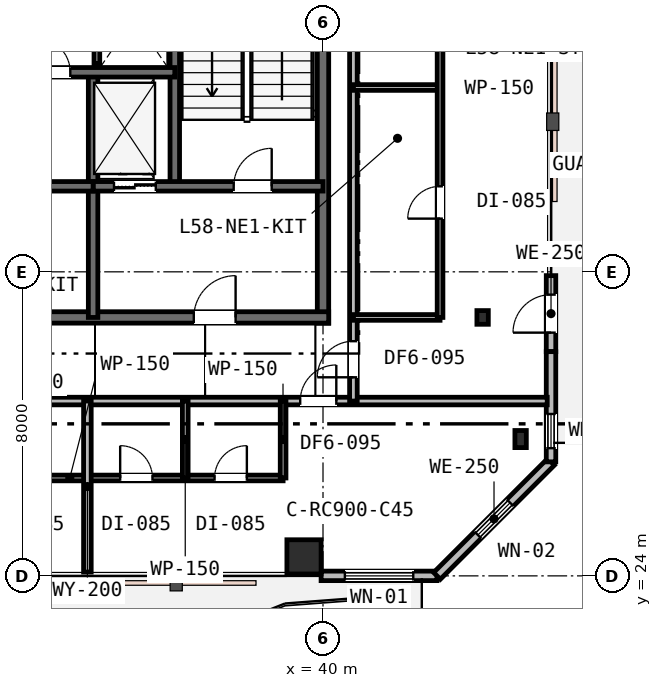
"""IFC4 building model, lengths in metres.
Left out: names, types, materials, properties, quantities, classifications, styles, units other than length and angle.
Written with IfcOpenShell. Run it as: python <this file> out.ifc"""

import sys

from ifc_helpers import new_model, si_unit, direction, frame, frame_2d, origin, origin_2d, place, context, subcontext, project, spatial, rectangle, i_section, extrude, element, fill, save


model = new_model("IFC4")
c1 = context("Model", 3, precision=1e-05, world=origin(), true_north=direction((0.0, 1.0)))
c2 = subcontext(c1, "Body", "Model", "MODEL_VIEW")
j1 = project(units=[si_unit("LENGTHUNIT", "METRE"), si_unit("PLANEANGLEUNIT", "RADIAN")], contexts=[c1])
p1 = place(None, origin())
s1 = spatial("IfcSite", under=j1, at=p1, CompositionType="ELEMENT")
p2 = place(p1, origin())
s2 = spatial("IfcBuilding", under=s1, at=p2, CompositionType="ELEMENT")
p3 = place(p2, frame((0.0, 0.0, 226.0)))
s3 = spatial("IfcBuildingStorey", under=s2, at=p3, CompositionType="ELEMENT", Elevation=226.0)
p4 = place(p3, frame((40.0, 30.65, 0.0), z_axis=(0.0, 0.0, 1.0), x_axis=(0.0, 1.0, 0.0)))
e1 = element("IfcWall", 1, at=p4, inside=s3, PredefinedType="SHEAR", context=c2, shape_type="SweptSolid", body=[
    extrude(rectangle(XDim=12.3, YDim=0.3, at=frame_2d((6.15, 0.0))), origin(), (0.0, 0.0, 1.0), 3.8),
])
p5 = place(p3, frame((28.95, 30.8, 0.0), z_axis=(0.0, 0.0, 1.0), x_axis=(1.0, 0.0, 0.0)))
e2 = element("IfcWall", 2, at=p5, inside=s3, PredefinedType="SHEAR", context=c2, shape_type="SweptSolid", body=[
    extrude(rectangle(XDim=11.2, YDim=0.3, at=frame_2d((5.6, 0.0))), origin(), (0.0, 0.0, 1.0), 3.8),
])
p6 = place(p5, frame((7.65, 0.0, 0.0)))
e3 = element("IfcOpeningElement", 3, at=p6, cuts=e2, PredefinedType="OPENING", context=c2, shape_type="SweptSolid", body=[
    extrude(rectangle(XDim=1.1, YDim=2.15, at=frame_2d((0.55, 1.075))), frame((0.0, 0.16, 0.0), z_axis=(0.0, -1.0, 0.0), x_axis=(1.0, 0.0, 0.0)), (0.0, 0.0, 1.0), 0.32),
])
p7 = place(p3, frame((36.1, 34.25, 0.0), z_axis=(0.0, 0.0, 1.0), x_axis=(0.0, 1.0, 0.0)))
e4 = element("IfcWall", 4, at=p7, inside=s3, PredefinedType="SHEAR", context=c2, shape_type="SweptSolid", body=[
    extrude(rectangle(XDim=8.65, YDim=0.25, at=frame_2d((4.325, 0.0))), origin(), (0.0, 0.0, 1.0), 3.8),
])
p8 = place(p3, frame((33.95, 30.8, 0.0), z_axis=(0.0, 0.0, 1.0), x_axis=(0.0, 1.0, 0.0)))
e5 = element("IfcWall", 5, at=p8, inside=s3, PredefinedType="SHEAR", context=c2, shape_type="SweptSolid", body=[
    extrude(rectangle(XDim=6.45, YDim=0.25, at=frame_2d((3.225, 0.0))), origin(), (0.0, 0.0, 1.0), 3.8),
])
p9 = place(p3, frame((33.95, 34.25, 0.0), z_axis=(0.0, 0.0, 1.0), x_axis=(1.0, 0.0, 0.0)))
e6 = element("IfcWall", 6, at=p9, inside=s3, PredefinedType="SHEAR", context=c2, shape_type="SweptSolid", body=[
    extrude(rectangle(XDim=6.05, YDim=0.25, at=frame_2d((3.025, 0.0))), origin(), (0.0, 0.0, 1.0), 3.8),
])
p10 = place(p9, frame((3.7, 0.0, 0.0)))
e7 = element("IfcOpeningElement", 7, at=p10, cuts=e6, PredefinedType="OPENING", context=c2, shape_type="SweptSolid", body=[
    extrude(rectangle(XDim=1.0, YDim=2.15, at=frame_2d((0.5, 1.075))), frame((0.0, 0.135, 0.0), z_axis=(0.0, -1.0, 0.0), x_axis=(1.0, 0.0, 0.0)), (0.0, 0.0, 1.0), 0.27),
])
p11 = place(p9, frame((0.55, 0.0, 0.0)))
e8 = element("IfcOpeningElement", 8, at=p11, cuts=e6, PredefinedType="OPENING", context=c2, shape_type="SweptSolid", body=[
    extrude(rectangle(XDim=1.1, YDim=2.15, at=frame_2d((0.55, 1.075))), frame((0.0, 0.135, 0.0), z_axis=(0.0, -1.0, 0.0), x_axis=(1.0, 0.0, 0.0)), (0.0, 0.0, 1.0), 0.27),
])
p12 = place(p3, frame((28.95, 34.25, 0.0), z_axis=(0.0, 0.0, 1.0), x_axis=(1.0, 0.0, 0.0)))
e9 = element("IfcWall", 9, at=p12, inside=s3, PredefinedType="SHEAR", context=c2, shape_type="SweptSolid", body=[
    extrude(rectangle(XDim=5.0, YDim=0.25, at=frame_2d((2.5, 0.0))), origin(), (0.0, 0.0, 1.0), 3.8),
])
p13 = place(p12, frame((1.95, 0.0, 0.0)))
e10 = element("IfcOpeningElement", 10, at=p13, cuts=e9, PredefinedType="OPENING", context=c2, shape_type="SweptSolid", body=[
    extrude(rectangle(XDim=1.0, YDim=2.15, at=frame_2d((0.5, 1.075))), frame((0.0, 0.135, 0.0), z_axis=(0.0, -1.0, 0.0), x_axis=(1.0, 0.0, 0.0)), (0.0, 0.0, 1.0), 0.27),
])
p14 = place(p3, frame((19.9, 37.25, 0.0), z_axis=(0.0, 0.0, 1.0), x_axis=(1.0, 0.0, 0.0)))
e11 = element("IfcWall", 11, at=p14, inside=s3, PredefinedType="SHEAR", context=c2, shape_type="SweptSolid", body=[
    extrude(rectangle(XDim=16.2, YDim=0.25, at=frame_2d((8.1, 0.0))), origin(), (0.0, 0.0, 1.0), 3.8),
])
p15 = place(p14, frame((12.55, 0.0, 0.0)))
e12 = element("IfcOpeningElement", 12, at=p15, cuts=e11, PredefinedType="OPENING", context=c2, shape_type="SweptSolid", body=[
    extrude(rectangle(XDim=0.9, YDim=2.15, at=frame_2d((0.45, 1.075))), frame((0.0, 0.135, 0.0), z_axis=(0.0, -1.0, 0.0), x_axis=(1.0, 0.0, 0.0)), (0.0, 0.0, 1.0), 0.27),
])
p16 = place(p14, frame((2.5, 0.0, 0.0)))
e13 = element("IfcOpeningElement", 13, at=p16, cuts=e11, PredefinedType="OPENING", context=c2, shape_type="SweptSolid", body=[
    extrude(rectangle(XDim=1.05, YDim=2.15, at=frame_2d((0.525, 1.075))), frame((0.0, 0.135, 0.0), z_axis=(0.0, -1.0, 0.0), x_axis=(1.0, 0.0, 0.0)), (0.0, 0.0, 1.0), 0.27),
])
p17 = place(p14, frame((4.4, 0.0, 0.0)))
e14 = element("IfcOpeningElement", 14, at=p17, cuts=e11, PredefinedType="OPENING", context=c2, shape_type="SweptSolid", body=[
    extrude(rectangle(XDim=1.05, YDim=2.15, at=frame_2d((0.525, 1.075))), frame((0.0, 0.135, 0.0), z_axis=(0.0, -1.0, 0.0), x_axis=(1.0, 0.0, 0.0)), (0.0, 0.0, 1.0), 0.27),
])
p18 = place(p14, frame((6.3, 0.0, 0.0)))
e15 = element("IfcOpeningElement", 15, at=p18, cuts=e11, PredefinedType="OPENING", context=c2, shape_type="SweptSolid", body=[
    extrude(rectangle(XDim=1.05, YDim=2.15, at=frame_2d((0.525, 1.075))), frame((0.0, 0.135, 0.0), z_axis=(0.0, -1.0, 0.0), x_axis=(1.0, 0.0, 0.0)), (0.0, 0.0, 1.0), 0.27),
])
p19 = place(p3, frame((39.5, 24.5, 0.0), z_axis=(0.0, 0.0, 1.0), x_axis=(1.0, 0.0, 0.0)))
e16 = element("IfcColumn", 16, at=p19, inside=s3, PredefinedType="COLUMN", context=c2, shape_type="SweptSolid", body=[
    extrude(rectangle(XDim=0.9, YDim=0.9, at=origin_2d()), origin(), (0.0, 0.0, 1.0), 3.8),
])
p20 = place(p3, frame((45.2, 27.6, 0.0), z_axis=(0.0, 0.0, 1.0), x_axis=(1.0, 0.0, 0.0)))
e17 = element("IfcColumn", 17, at=p20, inside=s3, PredefinedType="COLUMN", context=c2, shape_type="SweptSolid", body=[
    extrude(i_section(OverallWidth=0.3, OverallDepth=0.45, WebThickness=0.014, FlangeThickness=0.026, FilletRadius=0.027, at=origin_2d()), origin(), (0.0, 0.0, 1.0), 3.8),
])
p21 = place(p3, frame((44.2, 30.8, 0.0), z_axis=(0.0, 0.0, 1.0), x_axis=(1.0, 0.0, 0.0)))
e18 = element("IfcColumn", 18, at=p21, inside=s3, PredefinedType="COLUMN", context=c2, shape_type="SweptSolid", body=[
    extrude(i_section(OverallWidth=0.3, OverallDepth=0.36, WebThickness=0.013, FlangeThickness=0.022, FilletRadius=0.027, at=origin_2d()), origin(), (0.0, 0.0, 1.0), 3.8),
])
p22 = place(p3, frame((39.95, 24.0, 0.0), z_axis=(0.0, 0.0, 1.0), x_axis=(1.0, 0.0, 0.0)))
e19 = element("IfcWall", 19, at=p22, inside=s3, PredefinedType="STANDARD", context=c2, shape_type="SweptSolid", body=[
    extrude(rectangle(XDim=3.05, YDim=0.25, at=frame_2d((1.525, 0.0))), origin(), (0.0, 0.0, 1.0), 3.53),
])
p23 = place(p22, frame((0.625, 0.0, 0.75)))
e20 = element("IfcOpeningElement", 20, at=p23, cuts=e19, PredefinedType="OPENING", context=c2, shape_type="SweptSolid", body=[
    extrude(rectangle(XDim=1.8, YDim=1.85, at=frame_2d((0.9, 0.925))), frame((0.0, 0.135, 0.0), z_axis=(0.0, -1.0, 0.0), x_axis=(1.0, 0.0, 0.0)), (0.0, 0.0, 1.0), 0.27),
])
p24 = place(p3, frame((43.0, 24.0, 0.0), z_axis=(0.0, 0.0, 1.0), x_axis=(0.707106781187, 0.707106781187, 0.0)))
e21 = element("IfcWall", 21, at=p24, inside=s3, PredefinedType="STANDARD", context=c2, shape_type="SweptSolid", body=[
    extrude(rectangle(XDim=4.243, YDim=0.25, at=frame_2d((2.121, 0.0))), origin(), (0.0, 0.0, 1.0), 3.53),
])
p25 = place(p24, frame((1.521, 0.0, 0.85)))
e22 = element("IfcOpeningElement", 22, at=p25, cuts=e21, PredefinedType="OPENING", context=c2, shape_type="SweptSolid", body=[
    extrude(rectangle(XDim=1.2, YDim=1.6, at=frame_2d((0.6, 0.8))), frame((0.0, 0.135, 0.0), z_axis=(0.0, -1.0, 0.0), x_axis=(1.0, 0.0, 0.0)), (0.0, 0.0, 1.0), 0.27),
])
p26 = place(p3, frame((46.0, 29.9, 0.0), z_axis=(0.0, 0.0, 1.0), x_axis=(0.0, 1.0, 0.0)))
e23 = element("IfcWall", 23, at=p26, inside=s3, PredefinedType="STANDARD", context=c2, shape_type="SweptSolid", body=[
    extrude(rectangle(XDim=2.0, YDim=0.25, at=frame_2d((1.0, 0.0))), origin(), (0.0, 0.0, 1.0), 3.53),
])
p27 = place(p26, frame((0.5, 0.0, 0.0)))
e24 = element("IfcOpeningElement", 24, at=p27, cuts=e23, PredefinedType="OPENING", context=c2, shape_type="SweptSolid", body=[
    extrude(rectangle(XDim=1.0, YDim=2.15, at=frame_2d((0.5, 1.075))), frame((0.0, 0.135, 0.0), z_axis=(0.0, -1.0, 0.0), x_axis=(1.0, 0.0, 0.0)), (0.0, 0.0, 1.0), 0.27),
])
p28 = place(p3, frame((46.0, 27.0, 0.0), z_axis=(0.0, 0.0, 1.0), x_axis=(0.0, 1.0, 0.0)))
e25 = element("IfcWall", 25, at=p28, inside=s3, PredefinedType="STANDARD", context=c2, shape_type="SweptSolid", body=[
    extrude(rectangle(XDim=2.9, YDim=0.25, at=frame_2d((1.45, 0.0))), origin(), (0.0, 0.0, 1.0), 3.53),
])
p29 = place(p28, frame((0.36, 0.0, 0.9)))
e26 = element("IfcOpeningElement", 26, at=p29, cuts=e25, PredefinedType="OPENING", context=c2, shape_type="SweptSolid", body=[
    extrude(rectangle(XDim=0.9, YDim=1.55, at=frame_2d((0.45, 0.775))), frame((0.0, 0.135, 0.0), z_axis=(0.0, -1.0, 0.0), x_axis=(1.0, 0.0, 0.0)), (0.0, 0.0, 1.0), 0.27),
])
p30 = place(p3, frame((34.05, 37.473, 0.0), z_axis=(0.0, 0.0, 1.0), x_axis=(0.0, 1.0, 0.0)))
e27 = element("IfcWall", 27, at=p30, inside=s3, PredefinedType="PLUMBINGWALL", context=c2, shape_type="SweptSolid", body=[
    extrude(rectangle(XDim=2.577, YDim=0.15, at=frame_2d((1.288, 0.0))), origin(), (0.0, 0.0, 1.0), 3.53),
])
p31 = place(p3, frame((13.6, 28.6, 0.0), z_axis=(0.0, 0.0, 1.0), x_axis=(1.0, 0.0, 0.0)))
e28 = element("IfcWall", 28, at=p31, inside=s3, PredefinedType="PARTITIONING", context=c2, shape_type="SweptSolid", body=[
    extrude(rectangle(XDim=32.3, YDim=0.2, at=frame_2d((16.15, 0.0))), origin(), (0.0, 0.0, 1.0), 2.92),
])
p32 = place(p31, frame((11.787, 0.0, 0.0)))
e29 = element("IfcOpeningElement", 29, at=p32, cuts=e28, PredefinedType="OPENING", context=c2, shape_type="SweptSolid", body=[
    extrude(rectangle(XDim=0.95, YDim=2.15, at=frame_2d((0.475, 1.075))), frame((0.0, 0.11, 0.0), z_axis=(0.0, -1.0, 0.0), x_axis=(1.0, 0.0, 0.0)), (0.0, 0.0, 1.0), 0.22),
])
p33 = place(p31, frame((25.8, 0.0, 0.0)))
e30 = element("IfcOpeningElement", 30, at=p33, cuts=e28, PredefinedType="OPENING", context=c2, shape_type="SweptSolid", body=[
    extrude(rectangle(XDim=0.95, YDim=2.15, at=frame_2d((0.475, 1.075))), frame((0.0, 0.11, 0.0), z_axis=(0.0, -1.0, 0.0), x_axis=(1.0, 0.0, 0.0)), (0.0, 0.0, 1.0), 0.22),
])
p34 = place(p3, frame((40.8, 28.6, 0.0), z_axis=(0.0, 0.0, 1.0), x_axis=(0.0, 1.0, 0.0)))
e31 = element("IfcWall", 31, at=p34, inside=s3, PredefinedType="PARTITIONING", context=c2, shape_type="SweptSolid", body=[
    extrude(rectangle(XDim=14.3, YDim=0.2, at=frame_2d((7.15, 0.0))), origin(), (0.0, 0.0, 1.0), 2.92),
])
p35 = place(p34, frame((0.625, 0.0, 0.0)))
e32 = element("IfcOpeningElement", 32, at=p35, cuts=e31, PredefinedType="OPENING", context=c2, shape_type="SweptSolid", body=[
    extrude(rectangle(XDim=0.95, YDim=2.15, at=frame_2d((0.475, 1.075))), frame((0.0, 0.11, 0.0), z_axis=(0.0, -1.0, 0.0), x_axis=(1.0, 0.0, 0.0)), (0.0, 0.0, 1.0), 0.22),
])
p36 = place(p3, frame((40.8, 30.8, 0.0), z_axis=(0.0, 0.0, 1.0), x_axis=(1.0, 0.0, 0.0)))
e33 = element("IfcWall", 33, at=p36, inside=s3, PredefinedType="PARTITIONING", context=c2, shape_type="SweptSolid", body=[
    extrude(rectangle(XDim=2.28, YDim=0.15, at=frame_2d((1.14, 0.0))), origin(), (0.0, 0.0, 1.0), 2.92),
])
p37 = place(p3, frame((40.8, 36.85, 0.0), z_axis=(0.0, 0.0, 1.0), x_axis=(1.0, 0.0, 0.0)))
e34 = element("IfcWall", 34, at=p37, inside=s3, PredefinedType="PARTITIONING", context=c2, shape_type="SweptSolid", body=[
    extrude(rectangle(XDim=2.28, YDim=0.15, at=frame_2d((1.14, 0.0))), origin(), (0.0, 0.0, 1.0), 3.53),
])
p38 = place(p3, frame((43.08, 30.8, 0.0), z_axis=(0.0, 0.0, 1.0), x_axis=(0.0, 1.0, 0.0)))
e35 = element("IfcWall", 35, at=p38, inside=s3, PredefinedType="PARTITIONING", context=c2, shape_type="SweptSolid", body=[
    extrude(rectangle(XDim=12.02, YDim=0.15, at=frame_2d((6.01, 0.0))), origin(), (0.0, 0.0, 1.0), 2.92),
])
p39 = place(p38, frame((2.6, 0.0, 0.0)))
e36 = element("IfcOpeningElement", 36, at=p39, cuts=e35, PredefinedType="OPENING", context=c2, shape_type="SweptSolid", body=[
    extrude(rectangle(XDim=0.85, YDim=2.15, at=frame_2d((0.425, 1.075))), frame((0.0, 0.085, 0.0), z_axis=(0.0, -1.0, 0.0), x_axis=(1.0, 0.0, 0.0)), (0.0, 0.0, 1.0), 0.17),
])
p40 = place(p38, frame((10.629, 0.0, 0.0)))
e37 = element("IfcOpeningElement", 37, at=p40, cuts=e35, PredefinedType="OPENING", context=c2, shape_type="SweptSolid", body=[
    extrude(rectangle(XDim=0.85, YDim=2.15, at=frame_2d((0.425, 1.075))), frame((0.0, 0.085, 0.0), z_axis=(0.0, -1.0, 0.0), x_axis=(1.0, 0.0, 0.0)), (0.0, 0.0, 1.0), 0.17),
])
p41 = place(p3, frame((27.724, 26.576, 0.0), z_axis=(0.0, 0.0, 1.0), x_axis=(1.0, 0.0, 0.0)))
e38 = element("IfcWall", 38, at=p41, inside=s3, PredefinedType="PARTITIONING", context=c2, shape_type="SweptSolid", body=[
    extrude(rectangle(XDim=11.226, YDim=0.15, at=frame_2d((5.613, 0.0))), origin(), (0.0, 0.0, 1.0), 2.92),
])
p42 = place(p41, frame((1.094, 0.0, 0.0)))
e39 = element("IfcOpeningElement", 39, at=p42, cuts=e38, PredefinedType="OPENING", context=c2, shape_type="SweptSolid", body=[
    extrude(rectangle(XDim=0.85, YDim=2.15, at=frame_2d((0.425, 1.075))), frame((0.0, 0.085, 0.0), z_axis=(0.0, -1.0, 0.0), x_axis=(1.0, 0.0, 0.0)), (0.0, 0.0, 1.0), 0.17),
])
p43 = place(p41, frame((4.132, 0.0, 0.0)))
e40 = element("IfcOpeningElement", 40, at=p43, cuts=e38, PredefinedType="OPENING", context=c2, shape_type="SweptSolid", body=[
    extrude(rectangle(XDim=0.85, YDim=2.15, at=frame_2d((0.425, 1.075))), frame((0.0, 0.085, 0.0), z_axis=(0.0, -1.0, 0.0), x_axis=(1.0, 0.0, 0.0)), (0.0, 0.0, 1.0), 0.17),
])
p44 = place(p41, frame((6.939, 0.0, 0.0)))
e41 = element("IfcOpeningElement", 41, at=p44, cuts=e38, PredefinedType="OPENING", context=c2, shape_type="SweptSolid", body=[
    extrude(rectangle(XDim=0.85, YDim=2.15, at=frame_2d((0.425, 1.075))), frame((0.0, 0.085, 0.0), z_axis=(0.0, -1.0, 0.0), x_axis=(1.0, 0.0, 0.0)), (0.0, 0.0, 1.0), 0.17),
])
p45 = place(p41, frame((9.422, 0.0, 0.0)))
e42 = element("IfcOpeningElement", 42, at=p45, cuts=e38, PredefinedType="OPENING", context=c2, shape_type="SweptSolid", body=[
    extrude(rectangle(XDim=0.85, YDim=2.15, at=frame_2d((0.425, 1.075))), frame((0.0, 0.085, 0.0), z_axis=(0.0, -1.0, 0.0), x_axis=(1.0, 0.0, 0.0)), (0.0, 0.0, 1.0), 0.17),
])
p46 = place(p3, frame((33.8, 24.1, 0.0), z_axis=(0.0, 0.0, 1.0), x_axis=(0.0, 1.0, 0.0)))
e43 = element("IfcWall", 43, at=p46, inside=s3, PredefinedType="PARTITIONING", context=c2, shape_type="SweptSolid", body=[
    extrude(rectangle(XDim=4.5, YDim=0.2, at=frame_2d((2.25, 0.0))), origin(), (0.0, 0.0, 1.0), 3.24),
])
p47 = place(p3, frame((38.95, 26.576, 0.0), z_axis=(0.0, 0.0, 1.0), x_axis=(0.0, 1.0, 0.0)))
e44 = element("IfcWall", 44, at=p47, inside=s3, PredefinedType="PARTITIONING", context=c2, shape_type="SweptSolid", body=[
    extrude(rectangle(XDim=2.024, YDim=0.15, at=frame_2d((1.012, 0.0))), origin(), (0.0, 0.0, 1.0), 2.92),
])
p48 = place(p3, frame((36.375, 26.576, 0.0), z_axis=(0.0, 0.0, 1.0), x_axis=(0.0, 1.0, 0.0)))
e45 = element("IfcWall", 45, at=p48, inside=s3, PredefinedType="PARTITIONING", context=c2, shape_type="SweptSolid", body=[
    extrude(rectangle(XDim=2.024, YDim=0.15, at=frame_2d((1.012, 0.0))), origin(), (0.0, 0.0, 1.0), 3.53),
])
p49 = place(p23, origin())
e46 = element("IfcWindow", 46, at=p49, inside=s3, PartitioningType="SINGLE_PANEL", PredefinedType="WINDOW", context=c2, shape_type="SweptSolid", body=[
    extrude(rectangle(XDim=1.8, YDim=1.85, at=frame_2d((0.9, 0.925))), frame((0.0, 0.03, 0.0), z_axis=(0.0, -1.0, 0.0), x_axis=(1.0, 0.0, 0.0)), (0.0, 0.0, 1.0), 0.06),
])
fill(e20, e46)
p50 = place(p25, origin())
e47 = element("IfcWindow", 47, at=p50, inside=s3, PartitioningType="SINGLE_PANEL", PredefinedType="WINDOW", context=c2, shape_type="SweptSolid", body=[
    extrude(rectangle(XDim=1.2, YDim=1.6, at=frame_2d((0.6, 0.8))), frame((0.0, 0.03, 0.0), z_axis=(0.0, -1.0, 0.0), x_axis=(1.0, 0.0, 0.0)), (0.0, 0.0, 1.0), 0.06),
])
fill(e22, e47)
p51 = place(p27, origin())
e48 = element("IfcDoor", 48, at=p51, inside=s3, OperationType="SINGLE_SWING_LEFT", PredefinedType="DOOR", context=c2, shape_type="SweptSolid", body=[
    extrude(rectangle(XDim=1.0, YDim=2.15, at=frame_2d((0.5, 1.075))), frame((0.0, 0.025, 0.0), z_axis=(0.0, -1.0, 0.0), x_axis=(1.0, 0.0, 0.0)), (0.0, 0.0, 1.0), 0.05),
])
fill(e24, e48)
p52 = place(p29, origin())
e49 = element("IfcWindow", 49, at=p52, inside=s3, PartitioningType="SINGLE_PANEL", PredefinedType="WINDOW", context=c2, shape_type="SweptSolid", body=[
    extrude(rectangle(XDim=0.9, YDim=1.55, at=frame_2d((0.45, 0.775))), frame((0.0, 0.03, 0.0), z_axis=(0.0, -1.0, 0.0), x_axis=(1.0, 0.0, 0.0)), (0.0, 0.0, 1.0), 0.06),
])
fill(e26, e49)
p53 = place(p10, origin())
e50 = element("IfcDoor", 50, at=p53, inside=s3, OperationType="SINGLE_SWING_RIGHT", PredefinedType="DOOR", context=c2, shape_type="SweptSolid", body=[
    extrude(rectangle(XDim=1.0, YDim=2.15, at=frame_2d((0.5, 1.075))), frame((0.0, 0.025, 0.0), z_axis=(0.0, -1.0, 0.0), x_axis=(1.0, 0.0, 0.0)), (0.0, 0.0, 1.0), 0.05),
])
fill(e7, e50)
p54 = place(p6, origin())
e51 = element("IfcDoor", 51, at=p54, inside=s3, OperationType="SINGLE_SWING_RIGHT", PredefinedType="DOOR", context=c2, shape_type="SweptSolid", body=[
    extrude(rectangle(XDim=1.1, YDim=2.15, at=frame_2d((0.55, 1.075))), frame((0.0, 0.025, 0.0), z_axis=(0.0, -1.0, 0.0), x_axis=(1.0, 0.0, 0.0)), (0.0, 0.0, 1.0), 0.05),
])
fill(e3, e51)
p55 = place(p15, origin())
e52 = element("IfcDoor", 52, at=p55, inside=s3, OperationType="SINGLE_SWING_LEFT", PredefinedType="DOOR", context=c2, shape_type="SweptSolid", body=[
    extrude(rectangle(XDim=0.9, YDim=2.15, at=frame_2d((0.45, 1.075))), frame((0.0, 0.025, 0.0), z_axis=(0.0, -1.0, 0.0), x_axis=(1.0, 0.0, 0.0)), (0.0, 0.0, 1.0), 0.05),
])
fill(e12, e52)
p56 = place(p35, origin())
e53 = element("IfcDoor", 53, at=p56, inside=s3, OperationType="SINGLE_SWING_LEFT", PredefinedType="DOOR", context=c2, shape_type="SweptSolid", body=[
    extrude(rectangle(XDim=0.95, YDim=2.15, at=frame_2d((0.475, 1.075))), frame((0.0, 0.025, 0.0), z_axis=(0.0, -1.0, 0.0), x_axis=(1.0, 0.0, 0.0)), (0.0, 0.0, 1.0), 0.05),
])
fill(e32, e53)
p57 = place(p39, origin())
e54 = element("IfcDoor", 54, at=p57, inside=s3, OperationType="SINGLE_SWING_LEFT", PredefinedType="DOOR", context=c2, shape_type="SweptSolid", body=[
    extrude(rectangle(XDim=0.85, YDim=2.15, at=frame_2d((0.425, 1.075))), frame((0.0, 0.025, 0.0), z_axis=(0.0, -1.0, 0.0), x_axis=(1.0, 0.0, 0.0)), (0.0, 0.0, 1.0), 0.05),
])
fill(e36, e54)
p58 = place(p33, origin())
e55 = element("IfcDoor", 55, at=p58, inside=s3, OperationType="SINGLE_SWING_RIGHT", PredefinedType="DOOR", context=c2, shape_type="SweptSolid", body=[
    extrude(rectangle(XDim=0.95, YDim=2.15, at=frame_2d((0.475, 1.075))), frame((0.0, 0.025, 0.0), z_axis=(0.0, -1.0, 0.0), x_axis=(1.0, 0.0, 0.0)), (0.0, 0.0, 1.0), 0.05),
])
fill(e30, e55)
p59 = place(p44, origin())
e56 = element("IfcDoor", 56, at=p59, inside=s3, OperationType="SINGLE_SWING_LEFT", PredefinedType="DOOR", context=c2, shape_type="SweptSolid", body=[
    extrude(rectangle(XDim=0.85, YDim=2.15, at=frame_2d((0.425, 1.075))), frame((0.0, 0.025, 0.0), z_axis=(0.0, -1.0, 0.0), x_axis=(1.0, 0.0, 0.0)), (0.0, 0.0, 1.0), 0.05),
])
fill(e41, e56)
p60 = place(p45, origin())
e57 = element("IfcDoor", 57, at=p60, inside=s3, OperationType="SINGLE_SWING_RIGHT", PredefinedType="DOOR", context=c2, shape_type="SweptSolid", body=[
    extrude(rectangle(XDim=0.85, YDim=2.15, at=frame_2d((0.425, 1.075))), frame((0.0, 0.025, 0.0), z_axis=(0.0, -1.0, 0.0), x_axis=(1.0, 0.0, 0.0)), (0.0, 0.0, 1.0), 0.05),
])
fill(e42, e57)
p61 = place(p11, origin())
e58 = element("IfcDoor", 58, at=p61, inside=s3, OperationType="DOUBLE_DOOR_SLIDING", PredefinedType="DOOR", context=c2, shape_type="SweptSolid", body=[
    extrude(rectangle(XDim=1.1, YDim=2.15, at=frame_2d((0.55, 1.075))), frame((0.0, 0.025, 0.0), z_axis=(0.0, -1.0, 0.0), x_axis=(1.0, 0.0, 0.0)), (0.0, 0.0, 1.0), 0.05),
])
fill(e8, e58)
save(model, sys.argv[1])
